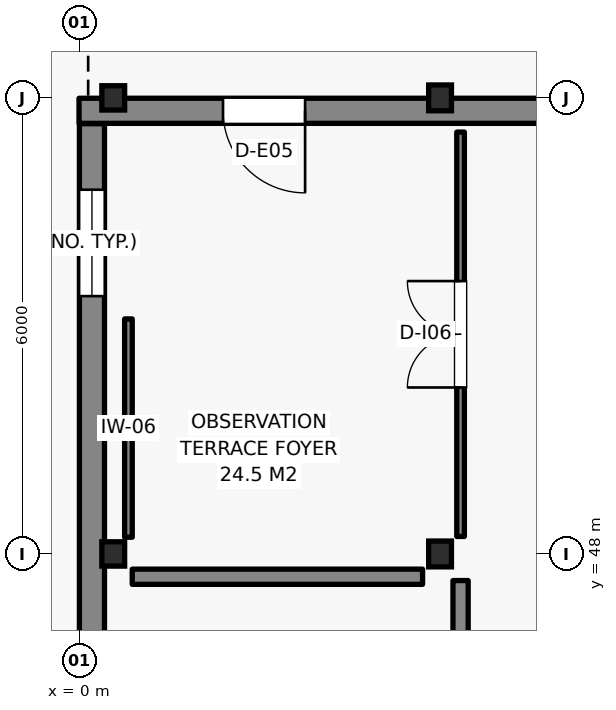
"""IFC4 building model, lengths in metres.
Left out: names, types, materials, properties, quantities, classifications, styles, units other than length and angle.
Written with IfcOpenShell. Run it as: python <this file> out.ifc"""

import sys

from ifc_helpers import new_model, si_unit, direction, frame, frame_2d, origin, origin_2d, place, context, subcontext, project, spatial, rectangle, i_section, extrude, element, fill, save


model = new_model("IFC4")
c1 = context("Model", 3, precision=1e-05, world=origin(), true_north=direction((0.0, 1.0)))
c2 = subcontext(c1, "Body", "Model", "MODEL_VIEW")
j1 = project(units=[si_unit("LENGTHUNIT", "METRE"), si_unit("PLANEANGLEUNIT", "RADIAN")], contexts=[c1])
p1 = place(None, origin())
s1 = spatial("IfcSite", under=j1, at=p1, CompositionType="ELEMENT")
p2 = place(p1, origin())
s2 = spatial("IfcBuilding", under=s1, at=p2, CompositionType="ELEMENT")
p3 = place(p2, frame((0.0, 0.0, 18.75)))
s3 = spatial("IfcBuildingStorey", under=s2, at=p3, CompositionType="ELEMENT", Elevation=18.75)
for number, where, z_axis, x_axis in (
    (1, (0.45, 48.0, 0.0), (0.0, 0.0, 1.0), (1.0, 0.0, 0.0)),
    (2, (0.45, 54.0, 0.0), (0.0, 0.0, 1.0), (1.0, 0.0, 0.0)),
):
    element("IfcColumn", number, at=place(p3, frame(where, z_axis=z_axis, x_axis=x_axis)), inside=s3, PredefinedType="COLUMN", context=c2, shape_type="SweptSolid", body=[
        extrude(i_section(OverallWidth=0.3, OverallDepth=0.32, WebThickness=0.011, FlangeThickness=0.021, FilletRadius=0.027, at=origin_2d()), origin(), (0.0, 0.0, 1.0), 3.71),
    ])
for number, where, z_axis, x_axis in (
    (3, (4.75, 48.0, 0.0), (0.0, 0.0, 1.0), (1.0, 0.0, 0.0)),
    (4, (4.75, 54.0, 0.0), (0.0, 0.0, 1.0), (1.0, 0.0, 0.0)),
):
    element("IfcColumn", number, at=place(p3, frame(where, z_axis=z_axis, x_axis=x_axis)), inside=s3, PredefinedType="COLUMN", context=c2, shape_type="SweptSolid", body=[
        extrude(i_section(OverallWidth=0.3, OverallDepth=0.34, WebThickness=0.012, FlangeThickness=0.021, FilletRadius=0.027, at=origin_2d()), origin(), (0.0, 0.0, 1.0), 3.71),
    ])
p4 = place(p3, frame((7.16, 53.83, 0.0), z_axis=(0.0, 0.0, 1.0), x_axis=(-1.0, 0.0, 0.0)))
e5 = element("IfcWall", 5, at=p4, inside=s3, PredefinedType="SOLIDWALL", context=c2, shape_type="SweptSolid", body=[
    extrude(rectangle(XDim=7.16, YDim=0.33, at=frame_2d((3.58, 0.0))), origin(), (0.0, 0.0, 1.0), 3.505),
])
p5 = place(p4, frame((4.186, 0.0, 0.0)))
e6 = element("IfcOpeningElement", 6, at=p5, cuts=e5, PredefinedType="OPENING", context=c2, shape_type="SweptSolid", body=[
    extrude(rectangle(XDim=1.08, YDim=2.2, at=frame_2d((0.54, 1.1))), frame((0.0, 0.175, 0.0), z_axis=(0.0, -1.0, 0.0), x_axis=(1.0, 0.0, 0.0)), (0.0, 0.0, 1.0), 0.35),
])
p6 = place(p3, frame((0.17, 53.66, 0.0), z_axis=(0.0, 0.0, 1.0), x_axis=(0.0, -1.0, 0.0)))
e7 = element("IfcWall", 7, at=p6, inside=s3, PredefinedType="SOLIDWALL", context=c2, shape_type="SweptSolid", body=[
    extrude(rectangle(XDim=53.315, YDim=0.33, at=frame_2d((26.657, 0.0))), origin(), (0.0, 0.0, 1.0), 3.345),
])
p7 = place(p6, frame((0.868, 0.0, 1.005)))
e8 = element("IfcOpeningElement", 8, at=p7, cuts=e7, PredefinedType="OPENING", context=c2, shape_type="SweptSolid", body=[
    extrude(rectangle(XDim=1.4, YDim=2.1, at=frame_2d((0.7, 1.05))), frame((0.0, 0.175, 0.0), z_axis=(0.0, -1.0, 0.0), x_axis=(1.0, 0.0, 0.0)), (0.0, 0.0, 1.0), 0.35),
])
p8 = place(p6, frame((7.14, 0.0, 1.005)))
e9 = element("IfcOpeningElement", 9, at=p8, cuts=e7, PredefinedType="OPENING", context=c2, shape_type="SweptSolid", body=[
    extrude(rectangle(XDim=1.4, YDim=2.1, at=frame_2d((0.7, 1.05))), frame((0.0, 0.175, 0.0), z_axis=(0.0, -1.0, 0.0), x_axis=(1.0, 0.0, 0.0)), (0.0, 0.0, 1.0), 0.35),
])
p9 = place(p6, frame((13.413, 0.0, 1.005)))
e10 = element("IfcOpeningElement", 10, at=p9, cuts=e7, PredefinedType="OPENING", context=c2, shape_type="SweptSolid", body=[
    extrude(rectangle(XDim=1.4, YDim=2.1, at=frame_2d((0.7, 1.05))), frame((0.0, 0.175, 0.0), z_axis=(0.0, -1.0, 0.0), x_axis=(1.0, 0.0, 0.0)), (0.0, 0.0, 1.0), 0.35),
])
p10 = place(p6, frame((19.685, 0.0, 1.005)))
e11 = element("IfcOpeningElement", 11, at=p10, cuts=e7, PredefinedType="OPENING", context=c2, shape_type="SweptSolid", body=[
    extrude(rectangle(XDim=1.4, YDim=2.1, at=frame_2d((0.7, 1.05))), frame((0.0, 0.175, 0.0), z_axis=(0.0, -1.0, 0.0), x_axis=(1.0, 0.0, 0.0)), (0.0, 0.0, 1.0), 0.35),
])
p11 = place(p6, frame((25.958, 0.0, 1.005)))
e12 = element("IfcOpeningElement", 12, at=p11, cuts=e7, PredefinedType="OPENING", context=c2, shape_type="SweptSolid", body=[
    extrude(rectangle(XDim=1.4, YDim=2.1, at=frame_2d((0.7, 1.05))), frame((0.0, 0.175, 0.0), z_axis=(0.0, -1.0, 0.0), x_axis=(1.0, 0.0, 0.0)), (0.0, 0.0, 1.0), 0.35),
])
p12 = place(p6, frame((32.23, 0.0, 1.005)))
e13 = element("IfcOpeningElement", 13, at=p12, cuts=e7, PredefinedType="OPENING", context=c2, shape_type="SweptSolid", body=[
    extrude(rectangle(XDim=1.4, YDim=2.1, at=frame_2d((0.7, 1.05))), frame((0.0, 0.175, 0.0), z_axis=(0.0, -1.0, 0.0), x_axis=(1.0, 0.0, 0.0)), (0.0, 0.0, 1.0), 0.35),
])
p13 = place(p6, frame((38.502, 0.0, 1.005)))
e14 = element("IfcOpeningElement", 14, at=p13, cuts=e7, PredefinedType="OPENING", context=c2, shape_type="SweptSolid", body=[
    extrude(rectangle(XDim=1.4, YDim=2.1, at=frame_2d((0.7, 1.05))), frame((0.0, 0.175, 0.0), z_axis=(0.0, -1.0, 0.0), x_axis=(1.0, 0.0, 0.0)), (0.0, 0.0, 1.0), 0.35),
])
p14 = place(p6, frame((44.775, 0.0, 1.005)))
e15 = element("IfcOpeningElement", 15, at=p14, cuts=e7, PredefinedType="OPENING", context=c2, shape_type="SweptSolid", body=[
    extrude(rectangle(XDim=1.4, YDim=2.1, at=frame_2d((0.7, 1.05))), frame((0.0, 0.175, 0.0), z_axis=(0.0, -1.0, 0.0), x_axis=(1.0, 0.0, 0.0)), (0.0, 0.0, 1.0), 0.35),
])
p15 = place(p6, frame((51.047, 0.0, 1.005)))
e16 = element("IfcOpeningElement", 16, at=p15, cuts=e7, PredefinedType="OPENING", context=c2, shape_type="SweptSolid", body=[
    extrude(rectangle(XDim=1.4, YDim=2.1, at=frame_2d((0.7, 1.05))), frame((0.0, 0.175, 0.0), z_axis=(0.0, -1.0, 0.0), x_axis=(1.0, 0.0, 0.0)), (0.0, 0.0, 1.0), 0.35),
])
p16 = place(p3, frame((5.02, 42.23, 0.0), z_axis=(0.0, 0.0, 1.0), x_axis=(0.0, 1.0, 0.0)))
e17 = element("IfcWall", 17, at=p16, inside=s3, PredefinedType="PARTITIONING", context=c2, shape_type="SweptSolid", body=[
    extrude(rectangle(XDim=5.42, YDim=0.2, at=frame_2d((2.71, 0.0))), origin(), (0.0, 0.0, 1.0), 3.345),
])
p17 = place(p16, frame((2.16, 0.0, 0.0)))
e18 = element("IfcOpeningElement", 18, at=p17, cuts=e17, PredefinedType="OPENING", context=c2, shape_type="SweptSolid", body=[
    extrude(rectangle(XDim=1.1, YDim=2.15, at=frame_2d((0.55, 1.075))), frame((0.0, 0.11, 0.0), z_axis=(0.0, -1.0, 0.0), x_axis=(1.0, 0.0, 0.0)), (0.0, 0.0, 1.0), 0.22),
])
p18 = place(p3, frame((4.52, 47.7, 0.0), z_axis=(0.0, 0.0, 1.0), x_axis=(-1.0, 0.0, 0.0)))
e19 = element("IfcWall", 19, at=p18, inside=s3, PredefinedType="PARTITIONING", context=c2, shape_type="SweptSolid", body=[
    extrude(rectangle(XDim=3.82, YDim=0.2, at=frame_2d((1.91, 0.0))), origin(), (0.0, 0.0, 1.0), 3.345),
])
p19 = place(p3, frame((5.02, 48.23, 0.0), z_axis=(0.0, 0.0, 1.0), x_axis=(0.0, 1.0, 0.0)))
e20 = element("IfcWall", 20, at=p19, inside=s3, PredefinedType="MOVABLE", context=c2, shape_type="SweptSolid", body=[
    extrude(rectangle(XDim=5.32, YDim=0.1, at=frame_2d((2.66, 0.0))), origin(), (0.0, 0.0, 1.0), 3.345),
])
p20 = place(p19, frame((1.96, 0.0, 0.0)))
e21 = element("IfcOpeningElement", 21, at=p20, cuts=e20, PredefinedType="OPENING", context=c2, shape_type="SweptSolid", body=[
    extrude(rectangle(XDim=1.4, YDim=2.2, at=frame_2d((0.7, 1.1))), frame((0.0, 0.06, 0.0), z_axis=(0.0, -1.0, 0.0), x_axis=(1.0, 0.0, 0.0)), (0.0, 0.0, 1.0), 0.12),
])
p21 = place(p3, frame((0.65, 51.092, 0.0), z_axis=(0.0, 0.0, 1.0), x_axis=(0.0, -1.0, 0.0)))
e22 = element("IfcWall", 22, at=p21, inside=s3, PredefinedType="MOVABLE", context=c2, shape_type="SweptSolid", body=[
    extrude(rectangle(XDim=2.872, YDim=0.1, at=frame_2d((1.436, 0.0))), origin(), (0.0, 0.0, 1.0), 3.345),
])
p22 = place(p5, origin())
e23 = element("IfcDoor", 23, at=p22, inside=s3, OperationType="SINGLE_SWING_LEFT", PredefinedType="DOOR", context=c2, shape_type="SweptSolid", body=[
    extrude(rectangle(XDim=1.08, YDim=2.2, at=frame_2d((0.54, 1.1))), frame((0.0, 0.025, 0.0), z_axis=(0.0, -1.0, 0.0), x_axis=(1.0, 0.0, 0.0)), (0.0, 0.0, 1.0), 0.05),
])
fill(e6, e23)
p23 = place(p7, origin())
e24 = element("IfcWindow", 24, at=p23, inside=s3, PartitioningType="SINGLE_PANEL", PredefinedType="WINDOW", context=c2, shape_type="SweptSolid", body=[
    extrude(rectangle(XDim=1.4, YDim=2.1, at=frame_2d((0.7, 1.05))), frame((0.0, 0.03, 0.0), z_axis=(0.0, -1.0, 0.0), x_axis=(1.0, 0.0, 0.0)), (0.0, 0.0, 1.0), 0.06),
])
fill(e8, e24)
p24 = place(p20, origin())
e25 = element("IfcDoor", 25, at=p24, inside=s3, OperationType="DOUBLE_DOOR_SINGLE_SWING", PredefinedType="DOOR", context=c2, shape_type="SweptSolid", body=[
    extrude(rectangle(XDim=1.4, YDim=2.2, at=frame_2d((0.7, 1.1))), frame((0.0, 0.025, 0.0), z_axis=(0.0, -1.0, 0.0), x_axis=(1.0, 0.0, 0.0)), (0.0, 0.0, 1.0), 0.05),
])
fill(e21, e25)
save(model, sys.argv[1])
